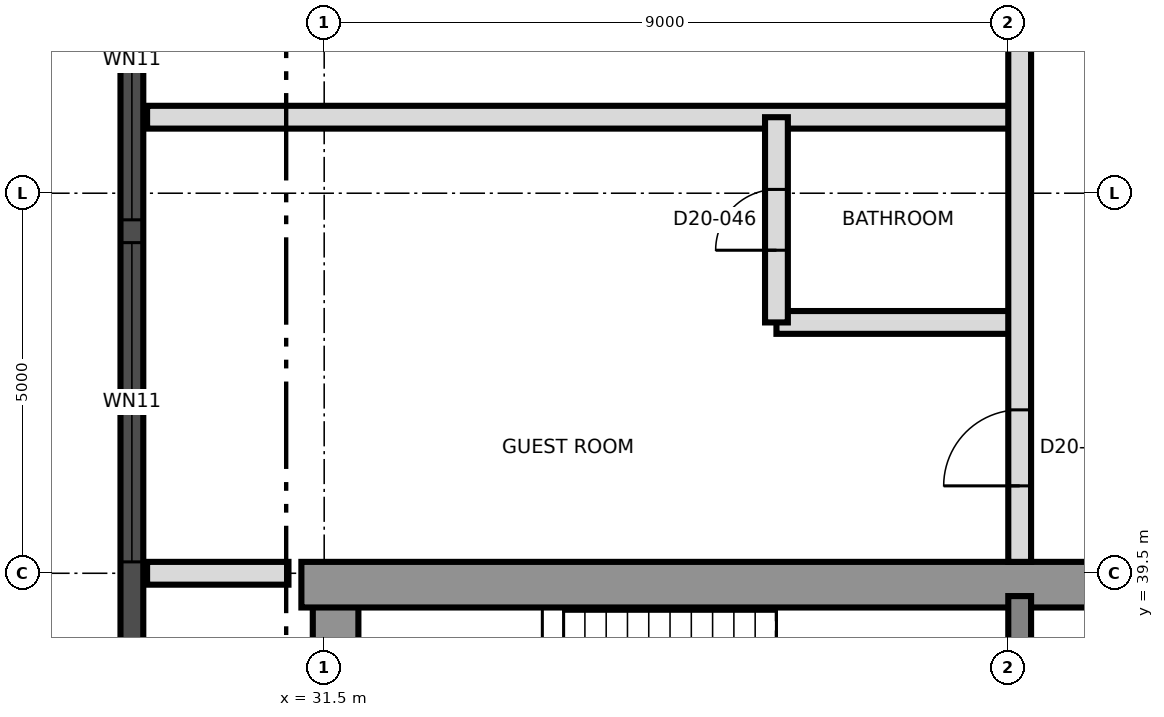
"""IFC4 building model, lengths in metres.
Left out: names, types, materials, properties, quantities, classifications, styles, units other than length and angle.
Written with IfcOpenShell. Run it as: python <this file> out.ifc"""

import sys

from ifc_helpers import new_model, si_unit, direction, frame, frame_2d, origin, place, context, subcontext, project, spatial, rectangle, extrude, element, fill, save


model = new_model("IFC4")
c1 = context("Model", 3, precision=1e-05, world=origin(), true_north=direction((0.0, 1.0)))
c2 = subcontext(c1, "Body", "Model", "MODEL_VIEW")
j1 = project(units=[si_unit("LENGTHUNIT", "METRE"), si_unit("PLANEANGLEUNIT", "RADIAN")], contexts=[c1])
p1 = place(None, origin())
s1 = spatial("IfcSite", under=j1, at=p1, CompositionType="ELEMENT")
p2 = place(p1, origin())
s2 = spatial("IfcBuilding", under=s1, at=p2, CompositionType="ELEMENT")
p3 = place(p2, frame((0.0, 0.0, 186.6)))
s3 = spatial("IfcBuildingStorey", under=s2, at=p3, CompositionType="ELEMENT", Elevation=186.6)
p4 = place(p3, frame((31.65, 21.8, 0.0), z_axis=(0.0, 0.0, 1.0), x_axis=(0.0, 1.0, 0.0)))
e1 = element("IfcWall", 1, at=p4, inside=s3, PredefinedType="SHEAR", context=c2, shape_type="SweptSolid", body=[
    extrude(rectangle(XDim=17.4, YDim=0.6, at=frame_2d((8.7, 0.0))), origin(), (0.0, 0.0, 1.0), 3.7),
])
p5 = place(p3, frame((31.2, 39.35, 0.0), z_axis=(0.0, 0.0, 1.0), x_axis=(1.0, 0.0, 0.0)))
e2 = element("IfcWall", 2, at=p5, inside=s3, PredefinedType="SHEAR", context=c2, shape_type="SweptSolid", body=[
    extrude(rectangle(XDim=27.0, YDim=0.6, at=frame_2d((13.5, 0.0))), origin(), (0.0, 0.0, 1.0), 3.7),
])
p6 = place(p5, frame((10.5, 0.0, 0.0)))
e3 = element("IfcOpeningElement", 3, at=p6, cuts=e2, PredefinedType="OPENING", context=c2, shape_type="SweptSolid", body=[
    extrude(rectangle(XDim=1.2, YDim=2.1, at=frame_2d((0.6, 1.05))), frame((0.0, 0.31, 0.0), z_axis=(0.0, -1.0, 0.0), x_axis=(1.0, 0.0, 0.0)), (0.0, 0.0, 1.0), 0.62),
])
p7 = place(p3, frame((40.65, 33.5, 0.0), z_axis=(0.0, 0.0, 1.0), x_axis=(0.0, 1.0, 0.0)))
e4 = element("IfcWall", 4, at=p7, inside=s3, PredefinedType="SHEAR", context=c2, shape_type="SweptSolid", body=[
    extrude(rectangle(XDim=5.7, YDim=0.3, at=frame_2d((2.85, 0.0))), origin(), (0.0, 0.0, 1.0), 3.7),
])
p8 = place(p3, frame((28.97, 66.986, 0.0), z_axis=(0.0, 0.0, 1.0), x_axis=(0.0, -1.0, 0.0)))
e5 = element("IfcWall", 5, at=p8, inside=s3, PredefinedType="SOLIDWALL", context=c2, shape_type="SweptSolid", body=[
    extrude(rectangle(XDim=32.976, YDim=0.3, at=frame_2d((16.488, 0.0))), origin(), (0.0, 0.0, 1.0), 3.4),
])
p9 = place(p8, frame((1.593, 0.0, 0.3)))
e6 = element("IfcOpeningElement", 6, at=p9, cuts=e5, PredefinedType="OPENING", context=c2, shape_type="SweptSolid", body=[
    extrude(rectangle(XDim=1.8, YDim=2.4, at=frame_2d((0.9, 1.2))), frame((0.0, 0.16, 0.0), z_axis=(0.0, -1.0, 0.0), x_axis=(1.0, 0.0, 0.0)), (0.0, 0.0, 1.0), 0.32),
])
p10 = place(p8, frame((5.136, 0.0, 0.9)))
e7 = element("IfcOpeningElement", 7, at=p10, cuts=e5, PredefinedType="OPENING", context=c2, shape_type="SweptSolid", body=[
    extrude(rectangle(XDim=4.2, YDim=1.5, at=frame_2d((2.1, 0.75))), frame((0.0, 0.16, 0.0), z_axis=(0.0, -1.0, 0.0), x_axis=(1.0, 0.0, 0.0)), (0.0, 0.0, 1.0), 0.32),
])
p11 = place(p8, frame((9.636, 0.0, 0.9)))
e8 = element("IfcOpeningElement", 8, at=p11, cuts=e5, PredefinedType="OPENING", context=c2, shape_type="SweptSolid", body=[
    extrude(rectangle(XDim=4.2, YDim=1.5, at=frame_2d((2.1, 0.75))), frame((0.0, 0.16, 0.0), z_axis=(0.0, -1.0, 0.0), x_axis=(1.0, 0.0, 0.0)), (0.0, 0.0, 1.0), 0.32),
])
p12 = place(p8, frame((14.136, 0.0, 0.9)))
e9 = element("IfcOpeningElement", 9, at=p12, cuts=e5, PredefinedType="OPENING", context=c2, shape_type="SweptSolid", body=[
    extrude(rectangle(XDim=4.2, YDim=1.5, at=frame_2d((2.1, 0.75))), frame((0.0, 0.16, 0.0), z_axis=(0.0, -1.0, 0.0), x_axis=(1.0, 0.0, 0.0)), (0.0, 0.0, 1.0), 0.32),
])
p13 = place(p8, frame((18.636, 0.0, 0.9)))
e10 = element("IfcOpeningElement", 10, at=p13, cuts=e5, PredefinedType="OPENING", context=c2, shape_type="SweptSolid", body=[
    extrude(rectangle(XDim=4.2, YDim=1.5, at=frame_2d((2.1, 0.75))), frame((0.0, 0.16, 0.0), z_axis=(0.0, -1.0, 0.0), x_axis=(1.0, 0.0, 0.0)), (0.0, 0.0, 1.0), 0.32),
])
p14 = place(p8, frame((23.136, 0.0, 0.9)))
e11 = element("IfcOpeningElement", 11, at=p14, cuts=e5, PredefinedType="OPENING", context=c2, shape_type="SweptSolid", body=[
    extrude(rectangle(XDim=4.2, YDim=1.5, at=frame_2d((2.1, 0.75))), frame((0.0, 0.16, 0.0), z_axis=(0.0, -1.0, 0.0), x_axis=(1.0, 0.0, 0.0)), (0.0, 0.0, 1.0), 0.32),
])
p15 = place(p8, frame((29.331, 0.0, 0.3)))
e12 = element("IfcOpeningElement", 12, at=p15, cuts=e5, PredefinedType="OPENING", context=c2, shape_type="SweptSolid", body=[
    extrude(rectangle(XDim=1.8, YDim=2.4, at=frame_2d((0.9, 1.2))), frame((0.0, 0.16, 0.0), z_axis=(0.0, -1.0, 0.0), x_axis=(1.0, 0.0, 0.0)), (0.0, 0.0, 1.0), 0.32),
])
p16 = place(p3, frame((29.17, 39.5, 0.0), z_axis=(0.0, 0.0, 1.0), x_axis=(1.0, 0.0, 0.0)))
e13 = element("IfcWall", 13, at=p16, inside=s3, PredefinedType="PARTITIONING", context=c2, shape_type="SweptSolid", body=[
    extrude(rectangle(XDim=1.86, YDim=0.3, at=frame_2d((0.93, 0.0))), origin(), (0.0, 0.0, 1.0), 3.35),
])
p17 = place(p3, frame((37.45, 42.8, 0.0), z_axis=(0.0, 0.0, 1.0), x_axis=(1.0, 0.0, 0.0)))
e14 = element("IfcWall", 14, at=p17, inside=s3, PredefinedType="PARTITIONING", context=c2, shape_type="SweptSolid", body=[
    extrude(rectangle(XDim=3.2, YDim=0.3, at=frame_2d((1.6, 0.0))), origin(), (0.0, 0.0, 1.0), 3.4),
])
p18 = place(p3, frame((29.17, 45.5, 0.0), z_axis=(0.0, 0.0, 1.0), x_axis=(1.0, 0.0, 0.0)))
e15 = element("IfcWall", 15, at=p18, inside=s3, PredefinedType="PARTITIONING", context=c2, shape_type="SweptSolid", body=[
    extrude(rectangle(XDim=11.48, YDim=0.3, at=frame_2d((5.74, 0.0))), origin(), (0.0, 0.0, 1.0), 3.35),
])
p19 = place(p3, frame((37.45, 42.8, 0.0), z_axis=(0.0, 0.0, 1.0), x_axis=(0.0, 1.0, 0.0)))
e16 = element("IfcWall", 16, at=p19, inside=s3, PredefinedType="PARTITIONING", context=c2, shape_type="SweptSolid", body=[
    extrude(rectangle(XDim=2.7, YDim=0.3, at=frame_2d((1.35, 0.0))), origin(), (0.0, 0.0, 1.0), 3.4),
])
p20 = place(p19, frame((0.95, 0.0, 0.0)))
e17 = element("IfcOpeningElement", 17, at=p20, cuts=e16, PredefinedType="OPENING", context=c2, shape_type="SweptSolid", body=[
    extrude(rectangle(XDim=0.8, YDim=2.1, at=frame_2d((0.4, 1.05))), frame((0.0, 0.16, 0.0), z_axis=(0.0, -1.0, 0.0), x_axis=(1.0, 0.0, 0.0)), (0.0, 0.0, 1.0), 0.32),
])
p21 = place(p3, frame((40.65, 39.65, 0.0), z_axis=(0.0, 0.0, 1.0), x_axis=(0.0, 1.0, 0.0)))
e18 = element("IfcWall", 18, at=p21, inside=s3, PredefinedType="PARTITIONING", context=c2, shape_type="SweptSolid", body=[
    extrude(rectangle(XDim=37.35, YDim=0.3, at=frame_2d((18.675, 0.0))), origin(), (0.0, 0.0, 1.0), 3.35),
])
p22 = place(p21, frame((1.0, 0.0, 0.0)))
e19 = element("IfcOpeningElement", 19, at=p22, cuts=e18, PredefinedType="OPENING", context=c2, shape_type="SweptSolid", body=[
    extrude(rectangle(XDim=1.0, YDim=2.1, at=frame_2d((0.5, 1.05))), frame((0.0, 0.16, 0.0), z_axis=(0.0, -1.0, 0.0), x_axis=(1.0, 0.0, 0.0)), (0.0, 0.0, 1.0), 0.32),
])
p23 = place(p21, frame((6.85, 0.0, 0.0)))
e20 = element("IfcOpeningElement", 20, at=p23, cuts=e18, PredefinedType="OPENING", context=c2, shape_type="SweptSolid", body=[
    extrude(rectangle(XDim=1.0, YDim=2.1, at=frame_2d((0.5, 1.05))), frame((0.0, 0.16, 0.0), z_axis=(0.0, -1.0, 0.0), x_axis=(1.0, 0.0, 0.0)), (0.0, 0.0, 1.0), 0.32),
])
p24 = place(p21, frame((10.0, 0.0, 0.0)))
e21 = element("IfcOpeningElement", 21, at=p24, cuts=e18, PredefinedType="OPENING", context=c2, shape_type="SweptSolid", body=[
    extrude(rectangle(XDim=1.0, YDim=2.1, at=frame_2d((0.5, 1.05))), frame((0.0, 0.16, 0.0), z_axis=(0.0, -1.0, 0.0), x_axis=(1.0, 0.0, 0.0)), (0.0, 0.0, 1.0), 0.32),
])
p25 = place(p21, frame((15.85, 0.0, 0.0)))
e22 = element("IfcOpeningElement", 22, at=p25, cuts=e18, PredefinedType="OPENING", context=c2, shape_type="SweptSolid", body=[
    extrude(rectangle(XDim=1.0, YDim=2.1, at=frame_2d((0.5, 1.05))), frame((0.0, 0.16, 0.0), z_axis=(0.0, -1.0, 0.0), x_axis=(1.0, 0.0, 0.0)), (0.0, 0.0, 1.0), 0.32),
])
p26 = place(p21, frame((21.35, 0.0, 0.0)))
e23 = element("IfcOpeningElement", 23, at=p26, cuts=e18, PredefinedType="OPENING", context=c2, shape_type="SweptSolid", body=[
    extrude(rectangle(XDim=1.0, YDim=2.1, at=frame_2d((0.5, 1.05))), frame((0.0, 0.16, 0.0), z_axis=(0.0, -1.0, 0.0), x_axis=(1.0, 0.0, 0.0)), (0.0, 0.0, 1.0), 0.32),
])
p27 = place(p13, origin())
e24 = element("IfcWindow", 24, at=p27, inside=s3, PartitioningType="SINGLE_PANEL", PredefinedType="WINDOW", context=c2, shape_type="SweptSolid", body=[
    extrude(rectangle(XDim=4.2, YDim=1.5, at=frame_2d((2.1, 0.75))), frame((0.0, 0.03, 0.0), z_axis=(0.0, -1.0, 0.0), x_axis=(1.0, 0.0, 0.0)), (0.0, 0.0, 1.0), 0.06),
])
fill(e10, e24)
p28 = place(p14, origin())
e25 = element("IfcWindow", 25, at=p28, inside=s3, PartitioningType="SINGLE_PANEL", PredefinedType="WINDOW", context=c2, shape_type="SweptSolid", body=[
    extrude(rectangle(XDim=4.2, YDim=1.5, at=frame_2d((2.1, 0.75))), frame((0.0, 0.03, 0.0), z_axis=(0.0, -1.0, 0.0), x_axis=(1.0, 0.0, 0.0)), (0.0, 0.0, 1.0), 0.06),
])
fill(e11, e25)
p29 = place(p20, origin())
e26 = element("IfcDoor", 26, at=p29, inside=s3, OperationType="SINGLE_SWING_RIGHT", PredefinedType="DOOR", context=c2, shape_type="SweptSolid", body=[
    extrude(rectangle(XDim=0.8, YDim=2.1, at=frame_2d((0.4, 1.05))), frame((0.0, 0.025, 0.0), z_axis=(0.0, -1.0, 0.0), x_axis=(1.0, 0.0, 0.0)), (0.0, 0.0, 1.0), 0.05),
])
fill(e17, e26)
p30 = place(p22, origin())
e27 = element("IfcDoor", 27, at=p30, inside=s3, OperationType="SINGLE_SWING_LEFT", PredefinedType="DOOR", context=c2, shape_type="SweptSolid", body=[
    extrude(rectangle(XDim=1.0, YDim=2.1, at=frame_2d((0.5, 1.05))), frame((0.0, 0.025, 0.0), z_axis=(0.0, -1.0, 0.0), x_axis=(1.0, 0.0, 0.0)), (0.0, 0.0, 1.0), 0.05),
])
fill(e19, e27)
save(model, sys.argv[1])
